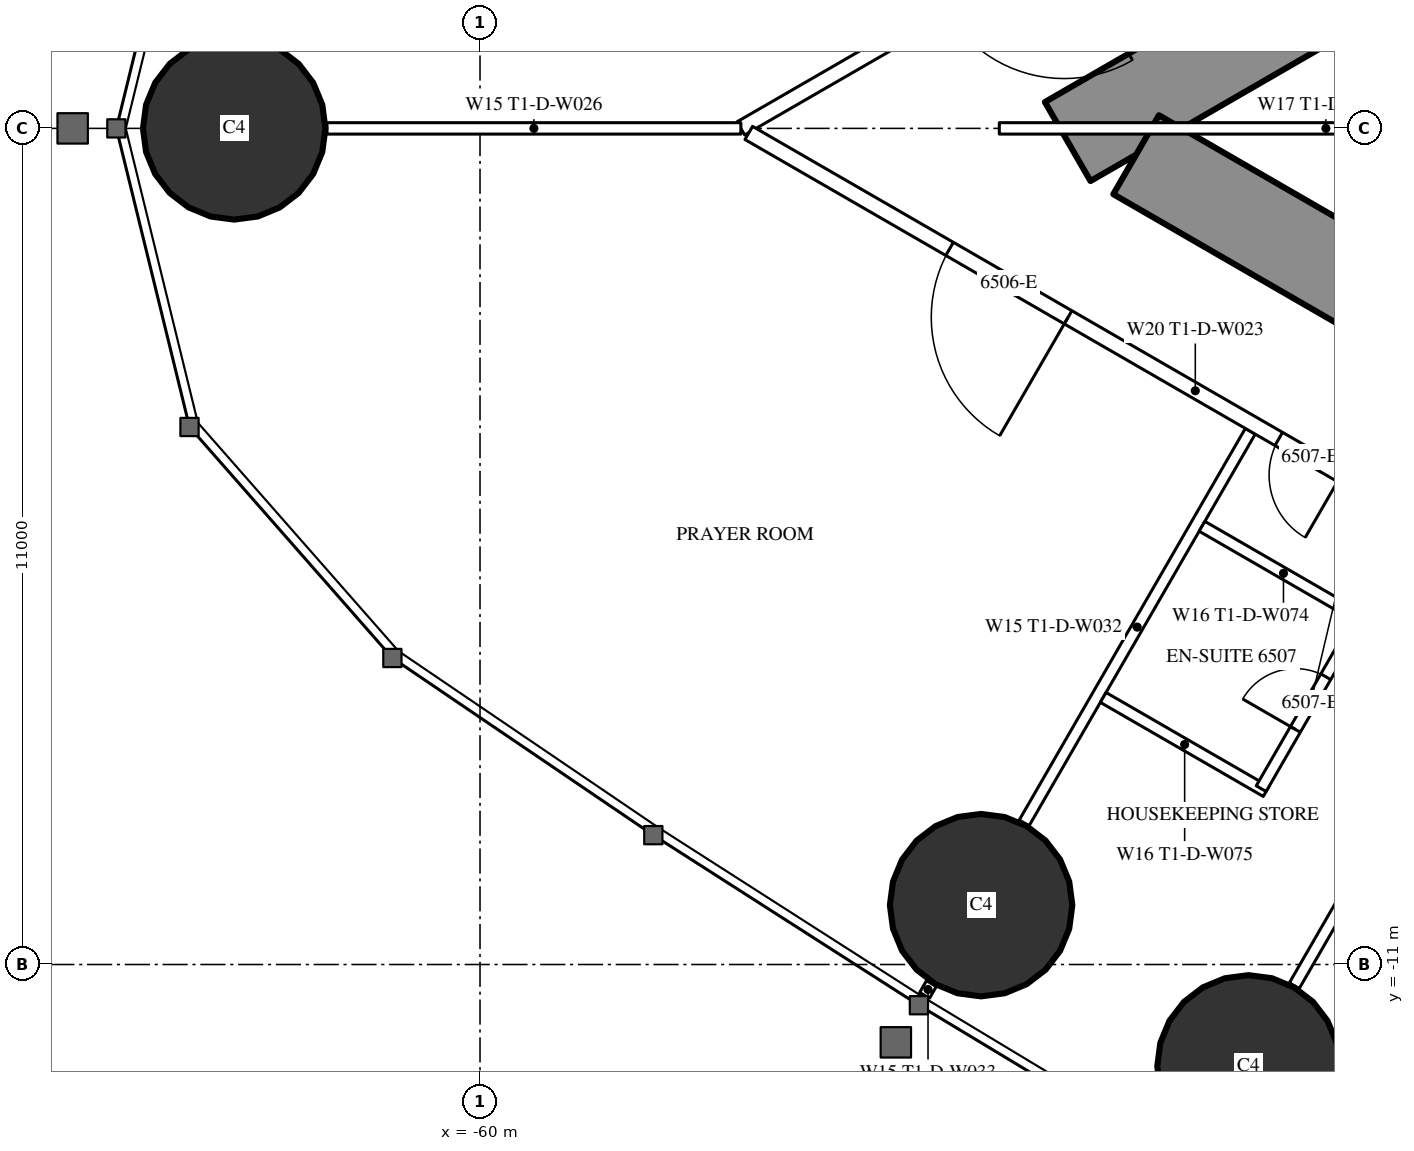
"""IFC4 building model, lengths in metres.
Left out: names, types, materials, properties, quantities, classifications, styles, units other than length and angle.
Written with IfcOpenShell. Run it as: python <this file> out.ifc"""

import sys

from ifc_helpers import new_model, si_unit, direction, frame, frame_2d, origin, origin_2d, place, context, subcontext, project, spatial, rectangle, circle, extrude, element, fill, save


model = new_model("IFC4")
c1 = context("Model", 3, precision=1e-05, world=origin(), true_north=direction((0.0, 1.0)))
c2 = subcontext(c1, "Body", "Model", "MODEL_VIEW")
j1 = project(units=[si_unit("LENGTHUNIT", "METRE"), si_unit("PLANEANGLEUNIT", "RADIAN")], contexts=[c1])
p1 = place(None, origin())
s1 = spatial("IfcSite", under=j1, at=p1, CompositionType="ELEMENT")
p2 = place(p1, origin())
s2 = spatial("IfcBuilding", under=s1, at=p2, CompositionType="ELEMENT")
p3 = place(p2, frame((0.0, 0.0, 244.1)))
s3 = spatial("IfcBuildingStorey", under=s2, at=p3, CompositionType="ELEMENT", Elevation=244.1)
for number, where, z_axis, x_axis in (
    (1, (-63.234, 0.0, 0.0), (0.0, 0.0, 1.0), (1.0, 0.0, 0.0)),
    (2, (-53.408, -10.219, 0.0), (0.0, 0.0, 1.0), (1.0, 0.0, 0.0)),
    (3, (-49.89, -12.34, 0.0), (0.0, 0.0, 1.0), (1.0, 0.0, 0.0)),
):
    element("IfcColumn", number, at=place(p3, frame(where, z_axis=z_axis, x_axis=x_axis)), inside=s3, PredefinedType="COLUMN", context=c2, shape_type="SweptSolid", body=[
        extrude(circle(Radius=1.2, at=origin_2d()), origin(), (0.0, 0.0, 1.0), 3.6),
    ])
p4 = place(p3, frame((-27.2, 14.3, 0.0), z_axis=(0.0, 0.0, 1.0), x_axis=(-0.866026593062, -0.499997940104, 0.0)))
e4 = element("IfcWall", 4, at=p4, inside=s3, PredefinedType="SHEAR", context=c2, shape_type="SweptSolid", body=[
    extrude(rectangle(XDim=28.946, YDim=1.2, at=frame_2d((14.473, 0.0))), origin(), (0.0, 0.0, 1.0), 3.6),
])
p5 = place(p4, frame((4.6, 0.0, 0.0)))
e5 = element("IfcOpeningElement", 5, at=p5, cuts=e4, PredefinedType="OPENING", context=c2, shape_type="SweptSolid", body=[
    extrude(rectangle(XDim=1.0, YDim=2.2, at=frame_2d((0.5, 1.1))), frame((0.0, 0.61, 0.0), z_axis=(0.0, -1.0, 0.0), x_axis=(1.0, 0.0, 0.0)), (0.0, 0.0, 1.0), 1.22),
])
p6 = place(p4, frame((13.395, 0.0, 0.0)))
e6 = element("IfcOpeningElement", 6, at=p6, cuts=e4, PredefinedType="OPENING", context=c2, shape_type="SweptSolid", body=[
    extrude(rectangle(XDim=1.8, YDim=2.2, at=frame_2d((0.9, 1.1))), frame((0.0, 0.61, 0.0), z_axis=(0.0, -1.0, 0.0), x_axis=(1.0, 0.0, 0.0)), (0.0, 0.0, 1.0), 1.22),
])
p7 = place(p3, frame((-27.2, -14.3, 0.0), z_axis=(0.0, 0.0, 1.0), x_axis=(-0.866024021859, 0.500002393557, 0.0)))
e7 = element("IfcWall", 7, at=p7, inside=s3, PredefinedType="SHEAR", context=c2, shape_type="SweptSolid", body=[
    extrude(rectangle(XDim=27.907, YDim=1.2, at=frame_2d((13.954, 0.0))), origin(), (0.0, 0.0, 1.0), 3.6),
])
p8 = place(p7, frame((4.6, 0.0, 0.0)))
e8 = element("IfcOpeningElement", 8, at=p8, cuts=e7, PredefinedType="OPENING", context=c2, shape_type="SweptSolid", body=[
    extrude(rectangle(XDim=1.0, YDim=2.2, at=frame_2d((0.5, 1.1))), frame((0.0, 0.61, 0.0), z_axis=(0.0, -1.0, 0.0), x_axis=(1.0, 0.0, 0.0)), (0.0, 0.0, 1.0), 1.22),
])
p9 = place(p7, frame((13.395, 0.0, 0.0)))
e9 = element("IfcOpeningElement", 9, at=p9, cuts=e7, PredefinedType="OPENING", context=c2, shape_type="SweptSolid", body=[
    extrude(rectangle(XDim=1.8, YDim=2.2, at=frame_2d((0.9, 1.1))), frame((0.0, 0.61, 0.0), z_axis=(0.0, -1.0, 0.0), x_axis=(1.0, 0.0, 0.0)), (0.0, 0.0, 1.0), 1.22),
])
p10 = place(p3, frame((-28.737, 16.068, 0.0), z_axis=(0.0, 0.0, 1.0), x_axis=(-0.866026057212, -0.499998868229, 0.0)))
e10 = element("IfcWall", 10, at=p10, inside=s3, PredefinedType="PARTITIONING", context=c2, shape_type="SweptSolid", body=[
    extrude(rectangle(XDim=32.137, YDim=0.2, at=frame_2d((16.068, 0.0))), origin(), (0.0, 0.0, 1.0), 3.35),
])
p11 = place(p10, frame((1.08, 0.0, 0.0)))
e11 = element("IfcOpeningElement", 11, at=p11, cuts=e10, PredefinedType="OPENING", context=c2, shape_type="SweptSolid", body=[
    extrude(rectangle(XDim=1.8, YDim=2.04, at=frame_2d((0.9, 1.02))), frame((0.0, 0.11, 0.0), z_axis=(0.0, -1.0, 0.0), x_axis=(1.0, 0.0, 0.0)), (0.0, 0.0, 1.0), 0.22),
])
p12 = place(p10, frame((6.86, 0.0, 0.0)))
e12 = element("IfcOpeningElement", 12, at=p12, cuts=e10, PredefinedType="OPENING", context=c2, shape_type="SweptSolid", body=[
    extrude(rectangle(XDim=1.0, YDim=2.2, at=frame_2d((0.5, 1.1))), frame((0.0, 0.11, 0.0), z_axis=(0.0, -1.0, 0.0), x_axis=(1.0, 0.0, 0.0)), (0.0, 0.0, 1.0), 0.22),
])
p13 = place(p10, frame((18.867, 0.0, 0.0)))
e13 = element("IfcOpeningElement", 13, at=p13, cuts=e10, PredefinedType="OPENING", context=c2, shape_type="SweptSolid", body=[
    extrude(rectangle(XDim=0.95, YDim=2.2, at=frame_2d((0.475, 1.1))), frame((0.0, 0.11, 0.0), z_axis=(0.0, -1.0, 0.0), x_axis=(1.0, 0.0, 0.0)), (0.0, 0.0, 1.0), 0.22),
])
p14 = place(p10, frame((23.015, 0.0, 0.0)))
e14 = element("IfcOpeningElement", 14, at=p14, cuts=e10, PredefinedType="OPENING", context=c2, shape_type="SweptSolid", body=[
    extrude(rectangle(XDim=0.95, YDim=2.2, at=frame_2d((0.475, 1.1))), frame((0.0, 0.11, 0.0), z_axis=(0.0, -1.0, 0.0), x_axis=(1.0, 0.0, 0.0)), (0.0, 0.0, 1.0), 0.22),
])
p15 = place(p10, frame((27.226, 0.0, 0.0)))
e15 = element("IfcOpeningElement", 15, at=p15, cuts=e10, PredefinedType="OPENING", context=c2, shape_type="SweptSolid", body=[
    extrude(rectangle(XDim=1.8, YDim=2.2, at=frame_2d((0.9, 1.1))), frame((0.0, 0.11, 0.0), z_axis=(0.0, -1.0, 0.0), x_axis=(1.0, 0.0, 0.0)), (0.0, 0.0, 1.0), 0.22),
])
p16 = place(p3, frame((-46.274, -6.059, 0.0), z_axis=(0.0, 0.0, 1.0), x_axis=(-0.500020471368, -0.866013584312, 0.0)))
e16 = element("IfcWall", 16, at=p16, inside=s3, PredefinedType="PARTITIONING", context=c2, shape_type="SweptSolid", body=[
    extrude(rectangle(XDim=6.028, YDim=0.15, at=frame_2d((3.014, 0.0))), origin(), (0.0, 0.0, 1.0), 2.45),
])
p17 = place(p16, frame((3.5, 0.0, 0.0)))
e17 = element("IfcOpeningElement", 17, at=p17, cuts=e16, PredefinedType="OPENING", context=c2, shape_type="SweptSolid", body=[
    extrude(rectangle(XDim=0.9, YDim=2.2, at=frame_2d((0.45, 1.1))), frame((0.0, 0.085, 0.0), z_axis=(0.0, -1.0, 0.0), x_axis=(1.0, 0.0, 0.0)), (0.0, 0.0, 1.0), 0.17),
])
p18 = place(p3, frame((-49.866, -3.985, 0.0), z_axis=(0.0, 0.0, 1.0), x_axis=(-0.500000694566, -0.866025002776, 0.0)))
e18 = element("IfcWall", 18, at=p18, inside=s3, PredefinedType="PARTITIONING", context=c2, shape_type="SweptSolid", body=[
    extrude(rectangle(XDim=5.95, YDim=0.15, at=frame_2d((2.975, 0.0))), origin(), (0.0, 0.0, 1.0), 2.45),
])
p19 = place(p3, frame((-54.061, -11.25, 0.0), z_axis=(0.0, 0.0, 1.0), x_axis=(-0.500391173478, -0.865799441849, 0.0)))
e19 = element("IfcWall", 19, at=p19, inside=s3, PredefinedType="PARTITIONING", context=c2, shape_type="SweptSolid", body=[
    extrude(rectangle(XDim=0.179, YDim=0.15, at=frame_2d((0.089, 0.0))), origin(), (0.0, 0.0, 1.0), 2.45),
])
p20 = place(p3, frame((-56.568, 0.0, 0.0), z_axis=(0.0, 0.0, 1.0), x_axis=(-1.0, 0.0, 0.0)))
e20 = element("IfcWall", 20, at=p20, inside=s3, PredefinedType="PARTITIONING", context=c2, shape_type="SweptSolid", body=[
    extrude(rectangle(XDim=5.446, YDim=0.15, at=frame_2d((2.723, 0.0))), origin(), (0.0, 0.0, 1.0), 2.45),
])
p21 = place(p3, frame((-44.715, -6.844, 0.0), z_axis=(0.0, 0.0, 1.0), x_axis=(-0.866025261224, 0.500000246922, 0.0)))
e21 = element("IfcWall", 21, at=p21, inside=s3, PredefinedType="PARTITIONING", context=c2, shape_type="SweptSolid", body=[
    extrude(rectangle(XDim=13.567, YDim=0.2, at=frame_2d((6.783, 0.0))), origin(), (0.0, 0.0, 1.0), 3.35),
])
p22 = place(p21, frame((8.716, 0.0, 0.0)))
e22 = element("IfcOpeningElement", 22, at=p22, cuts=e21, PredefinedType="OPENING", context=c2, shape_type="SweptSolid", body=[
    extrude(rectangle(XDim=1.8, YDim=2.2, at=frame_2d((0.9, 1.1))), frame((0.0, 0.11, 0.0), z_axis=(0.0, -1.0, 0.0), x_axis=(1.0, 0.0, 0.0)), (0.0, 0.0, 1.0), 0.22),
])
p23 = place(p21, frame((4.565, 0.0, 0.0)))
e23 = element("IfcOpeningElement", 23, at=p23, cuts=e21, PredefinedType="OPENING", context=c2, shape_type="SweptSolid", body=[
    extrude(rectangle(XDim=0.95, YDim=2.2, at=frame_2d((0.475, 1.1))), frame((0.0, 0.11, 0.0), z_axis=(0.0, -1.0, 0.0), x_axis=(1.0, 0.0, 0.0)), (0.0, 0.0, 1.0), 0.22),
])
p24 = place(p21, frame((0.5, 0.0, 0.0)))
e24 = element("IfcOpeningElement", 24, at=p24, cuts=e21, PredefinedType="OPENING", context=c2, shape_type="SweptSolid", body=[
    extrude(rectangle(XDim=0.967, YDim=2.2, at=frame_2d((0.483, 1.1))), frame((0.0, 0.11, 0.0), z_axis=(0.0, -1.0, 0.0), x_axis=(1.0, 0.0, 0.0)), (0.0, 0.0, 1.0), 0.22),
])
p25 = place(p3, frame((-49.658, -8.724, 0.0), z_axis=(0.0, 0.0, 1.0), x_axis=(-0.866031185235, 0.4999899861, 0.0)))
e25 = element("IfcWall", 25, at=p25, inside=s3, PredefinedType="PARTITIONING", context=c2, shape_type="SweptSolid", body=[
    extrude(rectangle(XDim=2.475, YDim=0.15, at=frame_2d((1.238, 0.0))), origin(), (0.0, 0.0, 1.0), 3.35),
])
p26 = place(p3, frame((-48.423, -6.435, 0.0), z_axis=(0.0, 0.0, 1.0), x_axis=(-0.500006934395, -0.866021400173, 0.0)))
e26 = element("IfcWall", 26, at=p26, inside=s3, PredefinedType="PARTITIONING", context=c2, shape_type="SweptSolid", body=[
    extrude(rectangle(XDim=2.6, YDim=0.15, at=frame_2d((1.3, 0.0))), origin(), (0.0, 0.0, 1.0), 3.35),
])
p27 = place(p26, frame((0.9, 0.0, 0.0)))
e27 = element("IfcOpeningElement", 27, at=p27, cuts=e26, PredefinedType="OPENING", context=c2, shape_type="SweptSolid", body=[
    extrude(rectangle(XDim=0.8, YDim=2.2, at=frame_2d((0.4, 1.1))), frame((0.0, 0.085, 0.0), z_axis=(0.0, -1.0, 0.0), x_axis=(1.0, 0.0, 0.0)), (0.0, 0.0, 1.0), 0.17),
])
p28 = place(p3, frame((-48.358, -6.472, 0.0), z_axis=(0.0, 0.0, 1.0), x_axis=(-0.866073894602, 0.499916002032, 0.0)))
e28 = element("IfcWall", 28, at=p28, inside=s3, PredefinedType="PARTITIONING", context=c2, shape_type="SweptSolid", body=[
    extrude(rectangle(XDim=2.475, YDim=0.15, at=frame_2d((1.238, 0.0))), origin(), (0.0, 0.0, 1.0), 2.5),
])
p29 = place(p3, frame((-44.575, 0.0, 0.0), z_axis=(0.0, 0.0, 1.0), x_axis=(-1.0, 0.0, 0.0)))
e29 = element("IfcWall", 29, at=p29, inside=s3, PredefinedType="PARTITIONING", context=c2, shape_type="SweptSolid", body=[
    extrude(rectangle(XDim=8.593, YDim=0.15, at=frame_2d((4.297, 0.0))), origin(), (0.0, 0.0, 1.0), 2.45),
])
p30 = place(p22, origin())
e30 = element("IfcDoor", 30, at=p30, inside=s3, OperationType="DOUBLE_DOOR_SINGLE_SWING", PredefinedType="DOOR", context=c2, shape_type="SweptSolid", body=[
    extrude(rectangle(XDim=1.8, YDim=2.2, at=frame_2d((0.9, 1.1))), frame((0.0, 0.025, 0.0), z_axis=(0.0, -1.0, 0.0), x_axis=(1.0, 0.0, 0.0)), (0.0, 0.0, 1.0), 0.05),
])
fill(e22, e30)
p31 = place(p27, origin())
e31 = element("IfcDoor", 31, at=p31, inside=s3, OperationType="SINGLE_SWING_RIGHT", PredefinedType="DOOR", context=c2, shape_type="SweptSolid", body=[
    extrude(rectangle(XDim=0.8, YDim=2.2, at=frame_2d((0.4, 1.1))), frame((0.0, 0.025, 0.0), z_axis=(0.0, -1.0, 0.0), x_axis=(1.0, 0.0, 0.0)), (0.0, 0.0, 1.0), 0.05),
])
fill(e27, e31)
p32 = place(p23, origin())
e32 = element("IfcDoor", 32, at=p32, inside=s3, OperationType="SINGLE_SWING_LEFT", PredefinedType="DOOR", context=c2, shape_type="SweptSolid", body=[
    extrude(rectangle(XDim=0.95, YDim=2.2, at=frame_2d((0.475, 1.1))), frame((0.0, 0.025, 0.0), z_axis=(0.0, -1.0, 0.0), x_axis=(1.0, 0.0, 0.0)), (0.0, 0.0, 1.0), 0.05),
])
fill(e23, e32)
save(model, sys.argv[1])
